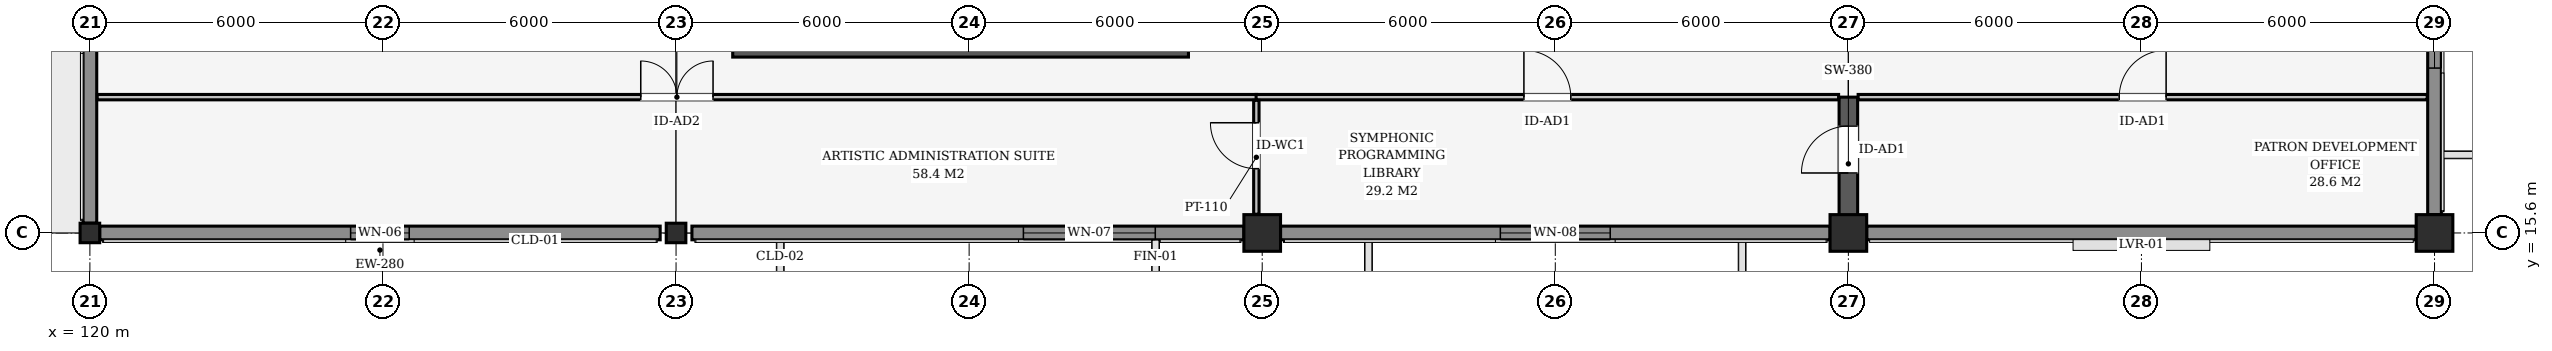
"""IFC4 building model, lengths in metres.
Left out: names, types, materials, properties, quantities, classifications, styles, units other than length and angle.
Written with IfcOpenShell. Run it as: python <this file> out.ifc"""

import sys

from ifc_helpers import new_model, si_unit, direction, frame, frame_2d, origin, origin_2d, place, context, subcontext, project, spatial, rectangle, i_section, extrude, element, fill, save


model = new_model("IFC4")
c1 = context("Model", 3, precision=1e-05, world=origin(), true_north=direction((0.0, 1.0)))
c2 = subcontext(c1, "Body", "Model", "MODEL_VIEW")
j1 = project(units=[si_unit("LENGTHUNIT", "METRE"), si_unit("PLANEANGLEUNIT", "RADIAN")], contexts=[c1])
p1 = place(None, origin())
s1 = spatial("IfcSite", under=j1, at=p1, CompositionType="ELEMENT")
p2 = place(p1, origin())
s2 = spatial("IfcBuilding", under=s1, at=p2, CompositionType="ELEMENT")
p3 = place(p2, frame((0.0, 0.0, 9.3)))
s3 = spatial("IfcBuildingStorey", under=s2, at=p3, CompositionType="ELEMENT", Elevation=9.3)
for number, where, z_axis, x_axis in (
    (1, (120.0, 15.6, 0.0), (0.0, 0.0, 1.0), (1.0, 0.0, 0.0)),
    (2, (132.0, 15.6, 0.0), (0.0, 0.0, 1.0), (1.0, 0.0, 0.0)),
):
    element("IfcColumn", number, at=place(p3, frame(where, z_axis=z_axis, x_axis=x_axis)), inside=s3, PredefinedType="COLUMN", context=c2, shape_type="SweptSolid", body=[
        extrude(i_section(OverallWidth=0.401, OverallDepth=0.399, WebThickness=0.025, FlangeThickness=0.04, at=origin_2d()), origin(), (0.0, 0.0, 1.0), 4.5),
    ])
for number, where, z_axis, x_axis in (
    (3, (144.0, 15.6, 0.0), (0.0, 0.0, 1.0), (1.0, 0.0, 0.0)),
    (4, (156.0, 15.6, 0.0), (0.0, 0.0, 1.0), (1.0, 0.0, 0.0)),
    (5, (168.0, 15.6, 0.0), (0.0, 0.0, 1.0), (1.0, 0.0, 0.0)),
):
    element("IfcColumn", number, at=place(p3, frame(where, z_axis=z_axis, x_axis=x_axis)), inside=s3, PredefinedType="COLUMN", context=c2, shape_type="SweptSolid", body=[
        extrude(rectangle(XDim=0.75, YDim=0.75, at=origin_2d()), origin(), (0.0, 0.0, 1.0), 4.5),
    ])
p4 = place(p3, frame((156.0, 15.65, 0.0), z_axis=(0.0, 0.0, 1.0), x_axis=(0.0, 1.0, 0.0)))
e6 = element("IfcWall", 6, at=p4, inside=s3, PredefinedType="SHEAR", context=c2, shape_type="SweptSolid", body=[
    extrude(rectangle(XDim=2.73, YDim=0.38, at=frame_2d((1.365, 0.0))), origin(), (0.0, 0.0, 1.0), 3.33),
])
p5 = place(p4, frame((1.177, 0.0, 0.0)))
e7 = element("IfcOpeningElement", 7, at=p5, cuts=e6, PredefinedType="OPENING", context=c2, shape_type="SweptSolid", body=[
    extrude(rectangle(XDim=0.96, YDim=2.16, at=frame_2d((0.48, 1.08))), frame((0.0, 0.2, 0.0), z_axis=(0.0, -1.0, 0.0), x_axis=(1.0, 0.0, 0.0)), (0.0, 0.0, 1.0), 0.4),
])
p6 = place(p3, frame((131.675, 15.6, 0.0), z_axis=(0.0, 0.0, 1.0), x_axis=(-1.0, 0.0, 0.0)))
e8 = element("IfcWall", 8, at=p6, inside=s3, PredefinedType="SOLIDWALL", context=c2, shape_type="SweptSolid", body=[
    extrude(rectangle(XDim=11.475, YDim=0.28, at=frame_2d((5.737, 0.0))), origin(), (0.0, 0.0, 1.0), 3.388),
])
p7 = place(p6, frame((5.137, 0.0, 0.85)))
e9 = element("IfcOpeningElement", 9, at=p7, cuts=e8, PredefinedType="OPENING", context=c2, shape_type="SweptSolid", body=[
    extrude(rectangle(XDim=1.2, YDim=1.5, at=frame_2d((0.6, 0.75))), frame((0.0, 0.15, 0.0), z_axis=(0.0, -1.0, 0.0), x_axis=(1.0, 0.0, 0.0)), (0.0, 0.0, 1.0), 0.3),
])
p8 = place(p3, frame((143.625, 15.6, 0.0), z_axis=(0.0, 0.0, 1.0), x_axis=(-1.0, 0.0, 0.0)))
e10 = element("IfcWall", 10, at=p8, inside=s3, PredefinedType="SOLIDWALL", context=c2, shape_type="SweptSolid", body=[
    extrude(rectangle(XDim=11.3, YDim=0.28, at=frame_2d((5.65, 0.0))), origin(), (0.0, 0.0, 1.0), 3.549),
])
p9 = place(p8, frame((1.814, 0.0, 0.85)))
e11 = element("IfcOpeningElement", 11, at=p9, cuts=e10, PredefinedType="OPENING", context=c2, shape_type="SweptSolid", body=[
    extrude(rectangle(XDim=2.7, YDim=1.95, at=frame_2d((1.35, 0.975))), frame((0.0, 0.15, 0.0), z_axis=(0.0, -1.0, 0.0), x_axis=(1.0, 0.0, 0.0)), (0.0, 0.0, 1.0), 0.3),
])
p10 = place(p3, frame((155.625, 15.6, 0.0), z_axis=(0.0, 0.0, 1.0), x_axis=(-1.0, 0.0, 0.0)))
e12 = element("IfcWall", 12, at=p10, inside=s3, PredefinedType="SOLIDWALL", context=c2, shape_type="SweptSolid", body=[
    extrude(rectangle(XDim=11.25, YDim=0.28, at=frame_2d((5.625, 0.0))), origin(), (0.0, 0.0, 1.0), 3.549),
])
p11 = place(p10, frame((4.5, 0.0, 0.85)))
e13 = element("IfcOpeningElement", 13, at=p11, cuts=e12, PredefinedType="OPENING", context=c2, shape_type="SweptSolid", body=[
    extrude(rectangle(XDim=2.25, YDim=1.95, at=frame_2d((1.125, 0.975))), frame((0.0, 0.15, 0.0), z_axis=(0.0, -1.0, 0.0), x_axis=(1.0, 0.0, 0.0)), (0.0, 0.0, 1.0), 0.3),
])
p12 = place(p3, frame((167.625, 15.6, 0.0), z_axis=(0.0, 0.0, 1.0), x_axis=(-1.0, 0.0, 0.0)))
e14 = element("IfcWall", 14, at=p12, inside=s3, PredefinedType="SOLIDWALL", context=c2, shape_type="SweptSolid", body=[
    extrude(rectangle(XDim=11.25, YDim=0.28, at=frame_2d((5.625, 0.0))), origin(), (0.0, 0.0, 1.0), 3.549),
])
p13 = place(p3, frame((168.0, 23.625, 0.0), z_axis=(0.0, 0.0, 1.0), x_axis=(0.0, -1.0, 0.0)))
e15 = element("IfcWall", 15, at=p13, inside=s3, PredefinedType="SOLIDWALL", context=c2, shape_type="SweptSolid", body=[
    extrude(rectangle(XDim=7.65, YDim=0.28, at=frame_2d((3.825, 0.0))), origin(), (0.0, 0.0, 1.0), 3.548),
])
p14 = place(p13, frame((3.0, 0.0, 0.85)))
e16 = element("IfcOpeningElement", 16, at=p14, cuts=e15, PredefinedType="OPENING", context=c2, shape_type="SweptSolid", body=[
    extrude(rectangle(XDim=1.65, YDim=1.75, at=frame_2d((0.825, 0.875))), frame((0.0, 0.15, 0.0), z_axis=(0.0, -1.0, 0.0), x_axis=(1.0, 0.0, 0.0)), (0.0, 0.0, 1.0), 0.3),
])
p15 = place(p3, frame((120.0, 15.8, 0.0), z_axis=(0.0, 0.0, 1.0), x_axis=(0.0, 1.0, 0.0)))
e17 = element("IfcWall", 17, at=p15, inside=s3, PredefinedType="SOLIDWALL", context=c2, shape_type="SweptSolid", body=[
    extrude(rectangle(XDim=8.003, YDim=0.28, at=frame_2d((4.002, 0.0))), origin(), (0.0, 0.0, 1.0), 3.764),
])
p16 = place(p15, frame((3.577, 0.0, 0.6)))
e18 = element("IfcOpeningElement", 18, at=p16, cuts=e17, PredefinedType="OPENING", context=c2, shape_type="SweptSolid", body=[
    extrude(rectangle(XDim=0.85, YDim=2.35, at=frame_2d((0.425, 1.175))), frame((0.0, 0.15, 0.0), z_axis=(0.0, -1.0, 0.0), x_axis=(1.0, 0.0, 0.0)), (0.0, 0.0, 1.0), 0.3),
])
p17 = place(p3, frame((133.16, 19.345, 0.0), z_axis=(0.0, 0.0, 1.0), x_axis=(1.0, 0.0, 0.0)))
e19 = element("IfcWall", 19, at=p17, inside=s3, PredefinedType="SHEAR", context=c2, shape_type="SweptSolid", body=[
    extrude(rectangle(XDim=9.33, YDim=0.29, at=frame_2d((4.665, 0.0))), origin(), (0.0, 0.0, 1.0), 4.18),
])
p18 = place(p3, frame((120.15, 18.38, 0.0), z_axis=(0.0, 0.0, 1.0), x_axis=(1.0, 0.0, 0.0)))
e20 = element("IfcWall", 20, at=p18, inside=s3, PredefinedType="PARTITIONING", context=c2, shape_type="SweptSolid", body=[
    extrude(rectangle(XDim=23.735, YDim=0.11, at=frame_2d((11.868, 0.0))), origin(), (0.0, 0.0, 1.0), 4.16),
])
p19 = place(p18, frame((11.127, 0.0, 0.0)))
e21 = element("IfcOpeningElement", 21, at=p19, cuts=e20, PredefinedType="OPENING", context=c2, shape_type="SweptSolid", body=[
    extrude(rectangle(XDim=1.48, YDim=2.22, at=frame_2d((0.74, 1.11))), frame((0.0, 0.065, 0.0), z_axis=(0.0, -1.0, 0.0), x_axis=(1.0, 0.0, 0.0)), (0.0, 0.0, 1.0), 0.13),
])
p20 = place(p3, frame((143.875, 18.38, 0.0), z_axis=(0.0, 0.0, 1.0), x_axis=(1.0, 0.0, 0.0)))
e22 = element("IfcWall", 22, at=p20, inside=s3, PredefinedType="PARTITIONING", context=c2, shape_type="SweptSolid", body=[
    extrude(rectangle(XDim=11.925, YDim=0.11, at=frame_2d((5.962, 0.0))), origin(), (0.0, 0.0, 1.0), 4.16),
])
p21 = place(p20, frame((5.482, 0.0, 0.0)))
e23 = element("IfcOpeningElement", 23, at=p21, cuts=e22, PredefinedType="OPENING", context=c2, shape_type="SweptSolid", body=[
    extrude(rectangle(XDim=0.96, YDim=2.16, at=frame_2d((0.48, 1.08))), frame((0.0, 0.065, 0.0), z_axis=(0.0, -1.0, 0.0), x_axis=(1.0, 0.0, 0.0)), (0.0, 0.0, 1.0), 0.13),
])
p22 = place(p3, frame((156.2, 18.38, 0.0), z_axis=(0.0, 0.0, 1.0), x_axis=(1.0, 0.0, 0.0)))
e24 = element("IfcWall", 24, at=p22, inside=s3, PredefinedType="PARTITIONING", context=c2, shape_type="SweptSolid", body=[
    extrude(rectangle(XDim=11.65, YDim=0.11, at=frame_2d((5.825, 0.0))), origin(), (0.0, 0.0, 1.0), 4.16),
])
p23 = place(p22, frame((5.345, 0.0, 0.0)))
e25 = element("IfcOpeningElement", 25, at=p23, cuts=e24, PredefinedType="OPENING", context=c2, shape_type="SweptSolid", body=[
    extrude(rectangle(XDim=0.96, YDim=2.16, at=frame_2d((0.48, 1.08))), frame((0.0, 0.065, 0.0), z_axis=(0.0, -1.0, 0.0), x_axis=(1.0, 0.0, 0.0)), (0.0, 0.0, 1.0), 0.13),
])
p24 = place(p3, frame((143.88, 15.983, 0.0), z_axis=(0.0, 0.0, 1.0), x_axis=(0.0, 1.0, 0.0)))
e26 = element("IfcWall", 26, at=p24, inside=s3, PredefinedType="PARTITIONING", context=c2, shape_type="SweptSolid", body=[
    extrude(rectangle(XDim=2.332, YDim=0.11, at=frame_2d((1.166, 0.0))), origin(), (0.0, 0.0, 1.0), 3.549),
])
p25 = place(p24, frame((0.933, 0.0, 0.0)))
e27 = element("IfcOpeningElement", 27, at=p25, cuts=e26, PredefinedType="OPENING", context=c2, shape_type="SweptSolid", body=[
    extrude(rectangle(XDim=0.94, YDim=2.1, at=frame_2d((0.47, 1.05))), frame((0.0, 0.065, 0.0), z_axis=(0.0, -1.0, 0.0), x_axis=(1.0, 0.0, 0.0)), (0.0, 0.0, 1.0), 0.13),
])
p26 = place(p7, origin())
e28 = element("IfcWindow", 28, at=p26, inside=s3, PartitioningType="SINGLE_PANEL", PredefinedType="WINDOW", context=c2, shape_type="SweptSolid", body=[
    extrude(rectangle(XDim=1.2, YDim=1.5, at=frame_2d((0.6, 0.75))), frame((0.0, 0.03, 0.0), z_axis=(0.0, -1.0, 0.0), x_axis=(1.0, 0.0, 0.0)), (0.0, 0.0, 1.0), 0.06),
])
fill(e9, e28)
p27 = place(p9, origin())
e29 = element("IfcWindow", 29, at=p27, inside=s3, PartitioningType="SINGLE_PANEL", PredefinedType="WINDOW", context=c2, shape_type="SweptSolid", body=[
    extrude(rectangle(XDim=2.7, YDim=1.95, at=frame_2d((1.35, 0.975))), frame((0.0, 0.03, 0.0), z_axis=(0.0, -1.0, 0.0), x_axis=(1.0, 0.0, 0.0)), (0.0, 0.0, 1.0), 0.06),
])
fill(e11, e29)
p28 = place(p11, origin())
e30 = element("IfcWindow", 30, at=p28, inside=s3, PartitioningType="SINGLE_PANEL", PredefinedType="WINDOW", context=c2, shape_type="SweptSolid", body=[
    extrude(rectangle(XDim=2.25, YDim=1.95, at=frame_2d((1.125, 0.975))), frame((0.0, 0.03, 0.0), z_axis=(0.0, -1.0, 0.0), x_axis=(1.0, 0.0, 0.0)), (0.0, 0.0, 1.0), 0.06),
])
fill(e13, e30)
p29 = place(p14, origin())
e31 = element("IfcWindow", 31, at=p29, inside=s3, PartitioningType="SINGLE_PANEL", PredefinedType="WINDOW", context=c2, shape_type="SweptSolid", body=[
    extrude(rectangle(XDim=1.65, YDim=1.75, at=frame_2d((0.825, 0.875))), frame((0.0, 0.03, 0.0), z_axis=(0.0, -1.0, 0.0), x_axis=(1.0, 0.0, 0.0)), (0.0, 0.0, 1.0), 0.06),
])
fill(e16, e31)
p30 = place(p19, origin())
e32 = element("IfcDoor", 32, at=p30, inside=s3, OperationType="DOUBLE_DOOR_SINGLE_SWING", PredefinedType="DOOR", context=c2, shape_type="SweptSolid", body=[
    extrude(rectangle(XDim=1.48, YDim=2.22, at=frame_2d((0.74, 1.11))), frame((0.0, 0.025, 0.0), z_axis=(0.0, -1.0, 0.0), x_axis=(1.0, 0.0, 0.0)), (0.0, 0.0, 1.0), 0.05),
])
fill(e21, e32)
p31 = place(p21, origin())
e33 = element("IfcDoor", 33, at=p31, inside=s3, OperationType="SINGLE_SWING_LEFT", PredefinedType="DOOR", context=c2, shape_type="SweptSolid", body=[
    extrude(rectangle(XDim=0.96, YDim=2.16, at=frame_2d((0.48, 1.08))), frame((0.0, 0.025, 0.0), z_axis=(0.0, -1.0, 0.0), x_axis=(1.0, 0.0, 0.0)), (0.0, 0.0, 1.0), 0.05),
])
fill(e23, e33)
p32 = place(p23, origin())
e34 = element("IfcDoor", 34, at=p32, inside=s3, OperationType="SINGLE_SWING_RIGHT", PredefinedType="DOOR", context=c2, shape_type="SweptSolid", body=[
    extrude(rectangle(XDim=0.96, YDim=2.16, at=frame_2d((0.48, 1.08))), frame((0.0, 0.025, 0.0), z_axis=(0.0, -1.0, 0.0), x_axis=(1.0, 0.0, 0.0)), (0.0, 0.0, 1.0), 0.05),
])
fill(e25, e34)
p33 = place(p25, origin())
e35 = element("IfcDoor", 35, at=p33, inside=s3, OperationType="SINGLE_SWING_RIGHT", PredefinedType="DOOR", context=c2, shape_type="SweptSolid", body=[
    extrude(rectangle(XDim=0.94, YDim=2.1, at=frame_2d((0.47, 1.05))), frame((0.0, 0.025, 0.0), z_axis=(0.0, -1.0, 0.0), x_axis=(1.0, 0.0, 0.0)), (0.0, 0.0, 1.0), 0.05),
])
fill(e27, e35)
p34 = place(p5, origin())
e36 = element("IfcDoor", 36, at=p34, inside=s3, OperationType="SINGLE_SWING_LEFT", PredefinedType="DOOR", context=c2, shape_type="SweptSolid", body=[
    extrude(rectangle(XDim=0.96, YDim=2.16, at=frame_2d((0.48, 1.08))), frame((0.0, 0.025, 0.0), z_axis=(0.0, -1.0, 0.0), x_axis=(1.0, 0.0, 0.0)), (0.0, 0.0, 1.0), 0.05),
])
fill(e7, e36)
save(model, sys.argv[1])
